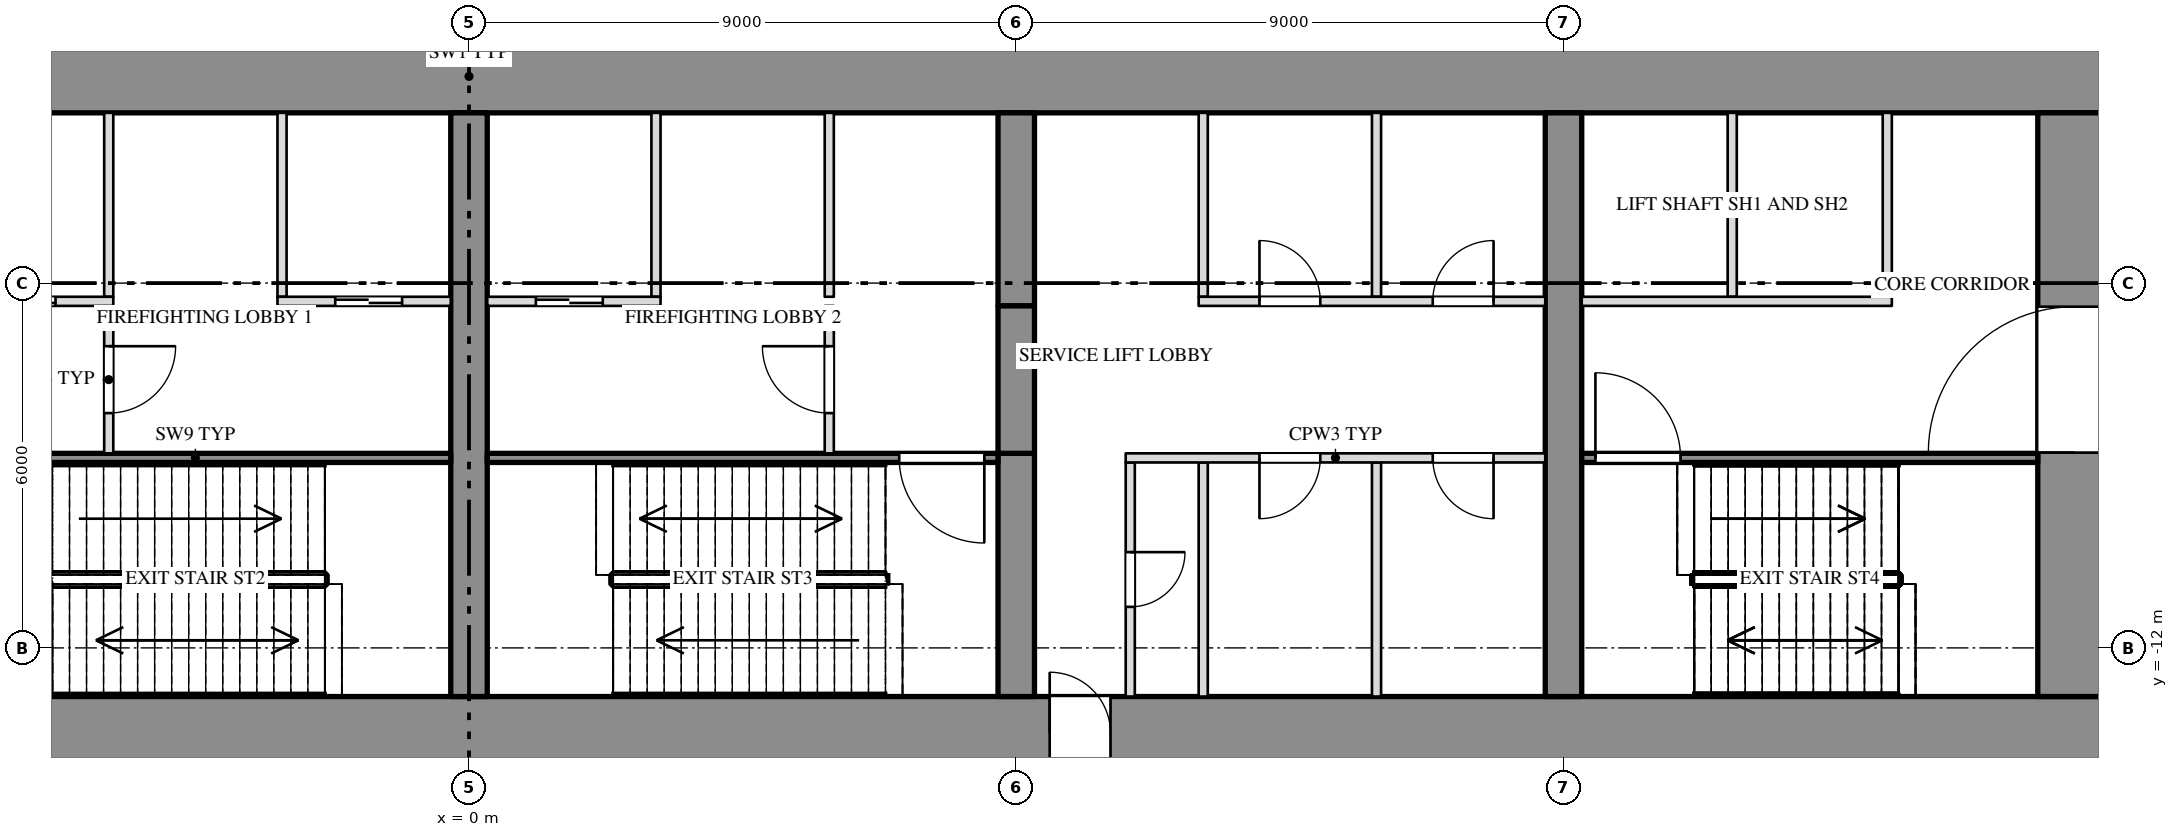
"""IFC4 building model, lengths in metres.
Left out: names, types, materials, properties, quantities, classifications, styles, units other than length and angle.
Written with IfcOpenShell. Run it as: python <this file> out.ifc"""

import sys

from ifc_helpers import new_model, si_unit, direction, frame, frame_2d, origin, place, context, subcontext, project, spatial, rectangle, extrude, element, fill, save


model = new_model("IFC4")
c1 = context("Model", 3, precision=1e-05, world=origin(), true_north=direction((0.0, 1.0)))
c2 = subcontext(c1, "Body", "Model", "MODEL_VIEW")
j1 = project(units=[si_unit("LENGTHUNIT", "METRE"), si_unit("PLANEANGLEUNIT", "RADIAN")], contexts=[c1])
p1 = place(None, origin())
s1 = spatial("IfcSite", under=j1, at=p1, CompositionType="ELEMENT")
p2 = place(p1, origin())
s2 = spatial("IfcBuilding", under=s1, at=p2, CompositionType="ELEMENT")
p3 = place(p2, frame((0.0, 0.0, 33.0)))
s3 = spatial("IfcBuildingStorey", under=s2, at=p3, CompositionType="ELEMENT", Elevation=33.0)
p4 = place(p3, frame((-27.0, -2.6, 0.0), z_axis=(0.0, 0.0, 1.0), x_axis=(1.0, 0.0, 0.0)))
e1 = element("IfcWall", 1, at=p4, inside=s3, PredefinedType="SHEAR", context=c2, shape_type="SweptSolid", body=[
    extrude(rectangle(XDim=54.0, YDim=1.2, at=frame_2d((27.0, 0.0))), origin(), (0.0, 0.0, 1.0), 5.75),
])
p5 = place(p3, frame((-27.0, -13.4, 0.0), z_axis=(0.0, 0.0, 1.0), x_axis=(1.0, 0.0, 0.0)))
e2 = element("IfcWall", 2, at=p5, inside=s3, PredefinedType="SHEAR", context=c2, shape_type="SweptSolid", body=[
    extrude(rectangle(XDim=54.0, YDim=1.2, at=frame_2d((27.0, 0.0))), origin(), (0.0, 0.0, 1.0), 5.75),
])
p6 = place(p5, frame((16.45, 0.0, 0.0)))
e3 = element("IfcOpeningElement", 3, at=p6, cuts=e2, PredefinedType="OPENING", context=c2, shape_type="SweptSolid", body=[
    extrude(rectangle(XDim=1.0, YDim=2.1, at=frame_2d((0.5, 1.05))), frame((0.0, 0.612, 0.0), z_axis=(0.0, -1.0, 0.0), x_axis=(1.0, 0.0, 0.0)), (0.0, 0.0, 1.0), 1.224),
])
p7 = place(p5, frame((36.55, 0.0, 0.0)))
e4 = element("IfcOpeningElement", 4, at=p7, cuts=e2, PredefinedType="OPENING", context=c2, shape_type="SweptSolid", body=[
    extrude(rectangle(XDim=1.0, YDim=2.1, at=frame_2d((0.5, 1.05))), frame((0.0, 0.612, 0.0), z_axis=(0.0, -1.0, 0.0), x_axis=(1.0, 0.0, 0.0)), (0.0, 0.0, 1.0), 1.224),
])
p8 = place(p3, frame((26.4, -12.8, 0.0), z_axis=(0.0, 0.0, 1.0), x_axis=(0.0, 1.0, 0.0)))
e5 = element("IfcWall", 5, at=p8, inside=s3, PredefinedType="SHEAR", context=c2, shape_type="SweptSolid", body=[
    extrude(rectangle(XDim=9.6, YDim=1.2, at=frame_2d((4.8, 0.0))), origin(), (0.0, 0.0, 1.0), 5.75),
])
p9 = place(p8, frame((4.012, 0.0, 0.0)))
e6 = element("IfcOpeningElement", 6, at=p9, cuts=e5, PredefinedType="OPENING", context=c2, shape_type="SweptSolid", body=[
    extrude(rectangle(XDim=2.4, YDim=2.1, at=frame_2d((1.2, 1.05))), frame((0.0, 0.612, 0.0), z_axis=(0.0, -1.0, 0.0), x_axis=(1.0, 0.0, 0.0)), (0.0, 0.0, 1.0), 1.224),
])
p10 = place(p3, frame((0.0, -12.8, 0.0), z_axis=(0.0, 0.0, 1.0), x_axis=(0.0, 1.0, 0.0)))
e7 = element("IfcWall", 7, at=p10, inside=s3, PredefinedType="SHEAR", context=c2, shape_type="SweptSolid", body=[
    extrude(rectangle(XDim=9.6, YDim=0.6, at=frame_2d((4.8, 0.0))), origin(), (0.0, 0.0, 1.0), 5.75),
])
p11 = place(p3, frame((9.0, -12.8, 0.0), z_axis=(0.0, 0.0, 1.0), x_axis=(0.0, 1.0, 0.0)))
e8 = element("IfcWall", 8, at=p11, inside=s3, PredefinedType="SHEAR", context=c2, shape_type="SweptSolid", body=[
    extrude(rectangle(XDim=4.0, YDim=0.6, at=frame_2d((2.0, 0.0))), origin(), (0.0, 0.0, 1.0), 5.75),
])
p12 = place(p3, frame((9.0, -6.375, 0.0), z_axis=(0.0, 0.0, 1.0), x_axis=(0.0, 1.0, 0.0)))
e9 = element("IfcWall", 9, at=p12, inside=s3, PredefinedType="SHEAR", context=c2, shape_type="SweptSolid", body=[
    extrude(rectangle(XDim=3.175, YDim=0.6, at=frame_2d((1.587, 0.0))), origin(), (0.0, 0.0, 1.0), 5.75),
])
p13 = place(p3, frame((9.0, -8.8, 3.6), z_axis=(0.0, 0.0, 1.0), x_axis=(0.0, 1.0, 0.0)))
e10 = element("IfcWall", 10, at=p13, inside=s3, PredefinedType="SHEAR", context=c2, shape_type="SweptSolid", body=[
    extrude(rectangle(XDim=2.425, YDim=0.6, at=frame_2d((1.212, 0.0))), origin(), (0.0, 0.0, 1.0), 2.15),
])
p14 = place(p3, frame((18.0, -12.8, 0.0), z_axis=(0.0, 0.0, 1.0), x_axis=(0.0, 1.0, 0.0)))
e11 = element("IfcWall", 11, at=p14, inside=s3, PredefinedType="SHEAR", context=c2, shape_type="SweptSolid", body=[
    extrude(rectangle(XDim=9.6, YDim=0.6, at=frame_2d((4.8, 0.0))), origin(), (0.0, 0.0, 1.0), 5.75),
])
for number, where, z_axis, x_axis in (
    (12, (-3.075, -6.225, 0.0), (0.0, 0.0, 1.0), (0.0, 1.0, 0.0)),
    (13, (-5.925, -6.225, 0.0), (0.0, 0.0, 1.0), (0.0, 1.0, 0.0)),
    (14, (3.075, -6.225, 0.0), (0.0, 0.0, 1.0), (0.0, 1.0, 0.0)),
    (15, (5.925, -6.225, 0.0), (0.0, 0.0, 1.0), (0.0, 1.0, 0.0)),
    (16, (12.075, -6.225, 0.0), (0.0, 0.0, 1.0), (0.0, 1.0, 0.0)),
    (17, (14.925, -6.225, 0.0), (0.0, 0.0, 1.0), (0.0, 1.0, 0.0)),
    (18, (20.775, -6.225, 0.0), (0.0, 0.0, 1.0), (0.0, 1.0, 0.0)),
    (19, (23.325, -6.225, 0.0), (0.0, 0.0, 1.0), (0.0, 1.0, 0.0)),
):
    element("IfcWall", number, at=place(p3, frame(where, z_axis=z_axis, x_axis=x_axis)), inside=s3, PredefinedType="PARTITIONING", context=c2, shape_type="SweptSolid", body=[
        extrude(rectangle(XDim=3.025, YDim=0.15, at=frame_2d((1.513, 0.0))), origin(), (0.0, 0.0, 1.0), 5.75),
    ])
p15 = place(p3, frame((10.875, -12.8, 0.0), z_axis=(0.0, 0.0, 1.0), x_axis=(0.0, 1.0, 0.0)))
e20 = element("IfcWall", 20, at=p15, inside=s3, PredefinedType="PARTITIONING", context=c2, shape_type="SweptSolid", body=[
    extrude(rectangle(XDim=3.85, YDim=0.15, at=frame_2d((1.925, 0.0))), origin(), (0.0, 0.0, 1.0), 5.75),
])
p16 = place(p15, frame((1.475, 0.0, 0.0)))
e21 = element("IfcOpeningElement", 21, at=p16, cuts=e20, PredefinedType="OPENING", context=c2, shape_type="SweptSolid", body=[
    extrude(rectangle(XDim=0.9, YDim=2.1, at=frame_2d((0.45, 1.05))), frame((0.0, 0.087, 0.0), z_axis=(0.0, -1.0, 0.0), x_axis=(1.0, 0.0, 0.0)), (0.0, 0.0, 1.0), 0.174),
])
for number, where, z_axis, x_axis in (
    (22, (12.075, -12.8, 0.0), (0.0, 0.0, 1.0), (0.0, 1.0, 0.0)),
    (23, (14.925, -12.8, 0.0), (0.0, 0.0, 1.0), (0.0, 1.0, 0.0)),
):
    element("IfcWall", number, at=place(p3, frame(where, z_axis=z_axis, x_axis=x_axis)), inside=s3, PredefinedType="PARTITIONING", context=c2, shape_type="SweptSolid", body=[
        extrude(rectangle(XDim=3.85, YDim=0.15, at=frame_2d((1.925, 0.0))), origin(), (0.0, 0.0, 1.0), 5.75),
    ])
p17 = place(p3, frame((-5.925, -8.8, 0.0), z_axis=(0.0, 0.0, 1.0), x_axis=(0.0, 1.0, 0.0)))
e24 = element("IfcWall", 24, at=p17, inside=s3, PredefinedType="PARTITIONING", context=c2, shape_type="SweptSolid", body=[
    extrude(rectangle(XDim=2.425, YDim=0.15, at=frame_2d((1.212, 0.0))), origin(), (0.0, 0.0, 1.0), 5.75),
])
p18 = place(p17, frame((0.662, 0.0, 0.0)))
e25 = element("IfcOpeningElement", 25, at=p18, cuts=e24, PredefinedType="OPENING", context=c2, shape_type="SweptSolid", body=[
    extrude(rectangle(XDim=1.1, YDim=2.1, at=frame_2d((0.55, 1.05))), frame((0.0, 0.087, 0.0), z_axis=(0.0, -1.0, 0.0), x_axis=(1.0, 0.0, 0.0)), (0.0, 0.0, 1.0), 0.174),
])
p19 = place(p3, frame((5.925, -8.8, 0.0), z_axis=(0.0, 0.0, 1.0), x_axis=(0.0, 1.0, 0.0)))
e26 = element("IfcWall", 26, at=p19, inside=s3, PredefinedType="PARTITIONING", context=c2, shape_type="SweptSolid", body=[
    extrude(rectangle(XDim=2.425, YDim=0.15, at=frame_2d((1.212, 0.0))), origin(), (0.0, 0.0, 1.0), 5.75),
])
p20 = place(p19, frame((0.662, 0.0, 0.0)))
e27 = element("IfcOpeningElement", 27, at=p20, cuts=e26, PredefinedType="OPENING", context=c2, shape_type="SweptSolid", body=[
    extrude(rectangle(XDim=1.1, YDim=2.1, at=frame_2d((0.55, 1.05))), frame((0.0, 0.087, 0.0), z_axis=(0.0, -1.0, 0.0), x_axis=(1.0, 0.0, 0.0)), (0.0, 0.0, 1.0), 0.174),
])
p21 = place(p3, frame((-8.7, -6.3, 0.0), z_axis=(0.0, 0.0, 1.0), x_axis=(1.0, 0.0, 0.0)))
e28 = element("IfcWall", 28, at=p21, inside=s3, PredefinedType="PARTITIONING", context=c2, shape_type="SweptSolid", body=[
    extrude(rectangle(XDim=2.85, YDim=0.15, at=frame_2d((1.425, 0.0))), origin(), (0.0, 0.0, 1.0), 5.75),
])
p22 = place(p21, frame((0.8, 0.0, 0.0)))
e29 = element("IfcOpeningElement", 29, at=p22, cuts=e28, PredefinedType="OPENING", context=c2, shape_type="SweptSolid", body=[
    extrude(rectangle(XDim=1.1, YDim=2.1, at=frame_2d((0.55, 1.05))), frame((0.0, 0.087, 0.0), z_axis=(0.0, -1.0, 0.0), x_axis=(1.0, 0.0, 0.0)), (0.0, 0.0, 1.0), 0.174),
])
p23 = place(p3, frame((-3.15, -6.3, 0.0), z_axis=(0.0, 0.0, 1.0), x_axis=(1.0, 0.0, 0.0)))
e30 = element("IfcWall", 30, at=p23, inside=s3, PredefinedType="PARTITIONING", context=c2, shape_type="SweptSolid", body=[
    extrude(rectangle(XDim=2.85, YDim=0.15, at=frame_2d((1.425, 0.0))), origin(), (0.0, 0.0, 1.0), 5.75),
])
p24 = place(p23, frame((0.95, 0.0, 0.0)))
e31 = element("IfcOpeningElement", 31, at=p24, cuts=e30, PredefinedType="OPENING", context=c2, shape_type="SweptSolid", body=[
    extrude(rectangle(XDim=1.1, YDim=2.1, at=frame_2d((0.55, 1.05))), frame((0.0, 0.087, 0.0), z_axis=(0.0, -1.0, 0.0), x_axis=(1.0, 0.0, 0.0)), (0.0, 0.0, 1.0), 0.174),
])
p25 = place(p3, frame((0.3, -6.3, 0.0), z_axis=(0.0, 0.0, 1.0), x_axis=(1.0, 0.0, 0.0)))
e32 = element("IfcWall", 32, at=p25, inside=s3, PredefinedType="PARTITIONING", context=c2, shape_type="SweptSolid", body=[
    extrude(rectangle(XDim=2.85, YDim=0.15, at=frame_2d((1.425, 0.0))), origin(), (0.0, 0.0, 1.0), 5.75),
])
p26 = place(p25, frame((0.8, 0.0, 0.0)))
e33 = element("IfcOpeningElement", 33, at=p26, cuts=e32, PredefinedType="OPENING", context=c2, shape_type="SweptSolid", body=[
    extrude(rectangle(XDim=1.1, YDim=2.1, at=frame_2d((0.55, 1.05))), frame((0.0, 0.087, 0.0), z_axis=(0.0, -1.0, 0.0), x_axis=(1.0, 0.0, 0.0)), (0.0, 0.0, 1.0), 0.174),
])
p27 = place(p3, frame((12.0, -6.3, 0.0), z_axis=(0.0, 0.0, 1.0), x_axis=(1.0, 0.0, 0.0)))
e34 = element("IfcWall", 34, at=p27, inside=s3, PredefinedType="PARTITIONING", context=c2, shape_type="SweptSolid", body=[
    extrude(rectangle(XDim=5.7, YDim=0.15, at=frame_2d((2.85, 0.0))), origin(), (0.0, 0.0, 1.0), 5.75),
])
p28 = place(p27, frame((1.0, 0.0, 0.0)))
e35 = element("IfcOpeningElement", 35, at=p28, cuts=e34, PredefinedType="OPENING", context=c2, shape_type="SweptSolid", body=[
    extrude(rectangle(XDim=1.0, YDim=2.1, at=frame_2d((0.5, 1.05))), frame((0.0, 0.087, 0.0), z_axis=(0.0, -1.0, 0.0), x_axis=(1.0, 0.0, 0.0)), (0.0, 0.0, 1.0), 0.174),
])
p29 = place(p27, frame((3.85, 0.0, 0.0)))
e36 = element("IfcOpeningElement", 36, at=p29, cuts=e34, PredefinedType="OPENING", context=c2, shape_type="SweptSolid", body=[
    extrude(rectangle(XDim=1.0, YDim=2.1, at=frame_2d((0.5, 1.05))), frame((0.0, 0.087, 0.0), z_axis=(0.0, -1.0, 0.0), x_axis=(1.0, 0.0, 0.0)), (0.0, 0.0, 1.0), 0.174),
])
p30 = place(p3, frame((18.3, -6.3, 0.0), z_axis=(0.0, 0.0, 1.0), x_axis=(1.0, 0.0, 0.0)))
e37 = element("IfcWall", 37, at=p30, inside=s3, PredefinedType="PARTITIONING", context=c2, shape_type="SweptSolid", body=[
    extrude(rectangle(XDim=5.1, YDim=0.15, at=frame_2d((2.55, 0.0))), origin(), (0.0, 0.0, 1.0), 5.75),
])
p31 = place(p3, frame((-8.7, -8.875, 0.0), z_axis=(0.0, 0.0, 1.0), x_axis=(1.0, 0.0, 0.0)))
e38 = element("IfcWall", 38, at=p31, inside=s3, PredefinedType="SHEAR", context=c2, shape_type="SweptSolid", body=[
    extrude(rectangle(XDim=8.4, YDim=0.15, at=frame_2d((4.2, 0.0))), origin(), (0.0, 0.0, 1.0), 5.75),
])
p32 = place(p31, frame((0.225, 0.0, 0.0)))
e39 = element("IfcOpeningElement", 39, at=p32, cuts=e38, PredefinedType="OPENING", context=c2, shape_type="SweptSolid", body=[
    extrude(rectangle(XDim=1.4, YDim=2.1, at=frame_2d((0.7, 1.05))), frame((0.0, 0.087, 0.0), z_axis=(0.0, -1.0, 0.0), x_axis=(1.0, 0.0, 0.0)), (0.0, 0.0, 1.0), 0.174),
])
p33 = place(p3, frame((0.3, -8.875, 0.0), z_axis=(0.0, 0.0, 1.0), x_axis=(1.0, 0.0, 0.0)))
e40 = element("IfcWall", 40, at=p33, inside=s3, PredefinedType="SHEAR", context=c2, shape_type="SweptSolid", body=[
    extrude(rectangle(XDim=8.4, YDim=0.15, at=frame_2d((4.2, 0.0))), origin(), (0.0, 0.0, 1.0), 5.75),
])
p34 = place(p33, frame((6.775, 0.0, 0.0)))
e41 = element("IfcOpeningElement", 41, at=p34, cuts=e40, PredefinedType="OPENING", context=c2, shape_type="SweptSolid", body=[
    extrude(rectangle(XDim=1.4, YDim=2.1, at=frame_2d((0.7, 1.05))), frame((0.0, 0.087, 0.0), z_axis=(0.0, -1.0, 0.0), x_axis=(1.0, 0.0, 0.0)), (0.0, 0.0, 1.0), 0.174),
])
p35 = place(p3, frame((10.8, -8.875, 0.0), z_axis=(0.0, 0.0, 1.0), x_axis=(1.0, 0.0, 0.0)))
e42 = element("IfcWall", 42, at=p35, inside=s3, PredefinedType="PARTITIONING", context=c2, shape_type="SweptSolid", body=[
    extrude(rectangle(XDim=6.9, YDim=0.15, at=frame_2d((3.45, 0.0))), origin(), (0.0, 0.0, 1.0), 5.75),
])
p36 = place(p35, frame((2.2, 0.0, 0.0)))
e43 = element("IfcOpeningElement", 43, at=p36, cuts=e42, PredefinedType="OPENING", context=c2, shape_type="SweptSolid", body=[
    extrude(rectangle(XDim=1.0, YDim=2.1, at=frame_2d((0.5, 1.05))), frame((0.0, 0.087, 0.0), z_axis=(0.0, -1.0, 0.0), x_axis=(1.0, 0.0, 0.0)), (0.0, 0.0, 1.0), 0.174),
])
p37 = place(p35, frame((5.05, 0.0, 0.0)))
e44 = element("IfcOpeningElement", 44, at=p37, cuts=e42, PredefinedType="OPENING", context=c2, shape_type="SweptSolid", body=[
    extrude(rectangle(XDim=1.0, YDim=2.1, at=frame_2d((0.5, 1.05))), frame((0.0, 0.087, 0.0), z_axis=(0.0, -1.0, 0.0), x_axis=(1.0, 0.0, 0.0)), (0.0, 0.0, 1.0), 0.174),
])
p38 = place(p3, frame((18.3, -8.875, 0.0), z_axis=(0.0, 0.0, 1.0), x_axis=(1.0, 0.0, 0.0)))
e45 = element("IfcWall", 45, at=p38, inside=s3, PredefinedType="SHEAR", context=c2, shape_type="SweptSolid", body=[
    extrude(rectangle(XDim=7.5, YDim=0.15, at=frame_2d((3.75, 0.0))), origin(), (0.0, 0.0, 1.0), 5.75),
])
p39 = place(p38, frame((0.225, 0.0, 0.0)))
e46 = element("IfcOpeningElement", 46, at=p39, cuts=e45, PredefinedType="OPENING", context=c2, shape_type="SweptSolid", body=[
    extrude(rectangle(XDim=1.4, YDim=2.1, at=frame_2d((0.7, 1.05))), frame((0.0, 0.087, 0.0), z_axis=(0.0, -1.0, 0.0), x_axis=(1.0, 0.0, 0.0)), (0.0, 0.0, 1.0), 0.174),
])
p40 = place(p22, origin())
e47 = element("IfcDoor", 47, at=p40, inside=s3, OperationType="SLIDING_TO_LEFT", PredefinedType="DOOR", context=c2, shape_type="SweptSolid", body=[
    extrude(rectangle(XDim=1.1, YDim=2.1, at=frame_2d((0.55, 1.05))), frame((0.0, 0.025, 0.0), z_axis=(0.0, -1.0, 0.0), x_axis=(1.0, 0.0, 0.0)), (0.0, 0.0, 1.0), 0.05),
])
fill(e29, e47)
p41 = place(p18, origin())
e48 = element("IfcDoor", 48, at=p41, inside=s3, OperationType="SINGLE_SWING_LEFT", PredefinedType="DOOR", context=c2, shape_type="SweptSolid", body=[
    extrude(rectangle(XDim=1.1, YDim=2.1, at=frame_2d((0.55, 1.05))), frame((0.0, 0.025, 0.0), z_axis=(0.0, -1.0, 0.0), x_axis=(1.0, 0.0, 0.0)), (0.0, 0.0, 1.0), 0.05),
])
fill(e25, e48)
p42 = place(p24, origin())
e49 = element("IfcDoor", 49, at=p42, inside=s3, OperationType="SLIDING_TO_LEFT", PredefinedType="DOOR", context=c2, shape_type="SweptSolid", body=[
    extrude(rectangle(XDim=1.1, YDim=2.1, at=frame_2d((0.55, 1.05))), frame((0.0, 0.025, 0.0), z_axis=(0.0, -1.0, 0.0), x_axis=(1.0, 0.0, 0.0)), (0.0, 0.0, 1.0), 0.05),
])
fill(e31, e49)
p43 = place(p26, origin())
e50 = element("IfcDoor", 50, at=p43, inside=s3, OperationType="SLIDING_TO_RIGHT", PredefinedType="DOOR", context=c2, shape_type="SweptSolid", body=[
    extrude(rectangle(XDim=1.1, YDim=2.1, at=frame_2d((0.55, 1.05))), frame((0.0, 0.025, 0.0), z_axis=(0.0, -1.0, 0.0), x_axis=(1.0, 0.0, 0.0)), (0.0, 0.0, 1.0), 0.05),
])
fill(e33, e50)
p44 = place(p20, origin())
e51 = element("IfcDoor", 51, at=p44, inside=s3, OperationType="SINGLE_SWING_RIGHT", PredefinedType="DOOR", context=c2, shape_type="SweptSolid", body=[
    extrude(rectangle(XDim=1.1, YDim=2.1, at=frame_2d((0.55, 1.05))), frame((0.0, 0.025, 0.0), z_axis=(0.0, -1.0, 0.0), x_axis=(1.0, 0.0, 0.0)), (0.0, 0.0, 1.0), 0.05),
])
fill(e27, e51)
p45 = place(p34, origin())
e52 = element("IfcDoor", 52, at=p45, inside=s3, OperationType="DOUBLE_DOOR_SINGLE_SWING", PredefinedType="DOOR", context=c2, shape_type="SweptSolid", body=[
    extrude(rectangle(XDim=1.4, YDim=2.1, at=frame_2d((0.7, 1.05))), frame((0.0, 0.025, 0.0), z_axis=(0.0, -1.0, 0.0), x_axis=(1.0, 0.0, 0.0)), (0.0, 0.0, 1.0), 0.05),
])
fill(e41, e52)
p46 = place(p7, origin())
e53 = element("IfcDoor", 53, at=p46, inside=s3, OperationType="SINGLE_SWING_LEFT", PredefinedType="DOOR", context=c2, shape_type="SweptSolid", body=[
    extrude(rectangle(XDim=1.0, YDim=2.1, at=frame_2d((0.5, 1.05))), frame((0.0, 0.025, 0.0), z_axis=(0.0, -1.0, 0.0), x_axis=(1.0, 0.0, 0.0)), (0.0, 0.0, 1.0), 0.05),
])
fill(e4, e53)
p47 = place(p16, origin())
e54 = element("IfcDoor", 54, at=p47, inside=s3, OperationType="SINGLE_SWING_LEFT", PredefinedType="DOOR", context=c2, shape_type="SweptSolid", body=[
    extrude(rectangle(XDim=0.9, YDim=2.1, at=frame_2d((0.45, 1.05))), frame((0.0, 0.025, 0.0), z_axis=(0.0, -1.0, 0.0), x_axis=(1.0, 0.0, 0.0)), (0.0, 0.0, 1.0), 0.05),
])
fill(e21, e54)
p48 = place(p36, origin())
e55 = element("IfcDoor", 55, at=p48, inside=s3, OperationType="SINGLE_SWING_RIGHT", PredefinedType="DOOR", context=c2, shape_type="SweptSolid", body=[
    extrude(rectangle(XDim=1.0, YDim=2.1, at=frame_2d((0.5, 1.05))), frame((0.0, 0.025, 0.0), z_axis=(0.0, -1.0, 0.0), x_axis=(1.0, 0.0, 0.0)), (0.0, 0.0, 1.0), 0.05),
])
fill(e43, e55)
p49 = place(p28, origin())
e56 = element("IfcDoor", 56, at=p49, inside=s3, OperationType="SINGLE_SWING_LEFT", PredefinedType="DOOR", context=c2, shape_type="SweptSolid", body=[
    extrude(rectangle(XDim=1.0, YDim=2.1, at=frame_2d((0.5, 1.05))), frame((0.0, 0.025, 0.0), z_axis=(0.0, -1.0, 0.0), x_axis=(1.0, 0.0, 0.0)), (0.0, 0.0, 1.0), 0.05),
])
fill(e35, e56)
p50 = place(p37, origin())
e57 = element("IfcDoor", 57, at=p50, inside=s3, OperationType="SINGLE_SWING_LEFT", PredefinedType="DOOR", context=c2, shape_type="SweptSolid", body=[
    extrude(rectangle(XDim=1.0, YDim=2.1, at=frame_2d((0.5, 1.05))), frame((0.0, 0.025, 0.0), z_axis=(0.0, -1.0, 0.0), x_axis=(1.0, 0.0, 0.0)), (0.0, 0.0, 1.0), 0.05),
])
fill(e44, e57)
p51 = place(p29, origin())
e58 = element("IfcDoor", 58, at=p51, inside=s3, OperationType="SINGLE_SWING_RIGHT", PredefinedType="DOOR", context=c2, shape_type="SweptSolid", body=[
    extrude(rectangle(XDim=1.0, YDim=2.1, at=frame_2d((0.5, 1.05))), frame((0.0, 0.025, 0.0), z_axis=(0.0, -1.0, 0.0), x_axis=(1.0, 0.0, 0.0)), (0.0, 0.0, 1.0), 0.05),
])
fill(e36, e58)
p52 = place(p39, origin())
e59 = element("IfcDoor", 59, at=p52, inside=s3, OperationType="DOUBLE_DOOR_SINGLE_SWING", PredefinedType="DOOR", context=c2, shape_type="SweptSolid", body=[
    extrude(rectangle(XDim=1.4, YDim=2.1, at=frame_2d((0.7, 1.05))), frame((0.0, 0.025, 0.0), z_axis=(0.0, -1.0, 0.0), x_axis=(1.0, 0.0, 0.0)), (0.0, 0.0, 1.0), 0.05),
])
fill(e46, e59)
p53 = place(p9, origin())
e60 = element("IfcDoor", 60, at=p53, inside=s3, OperationType="DOUBLE_DOOR_SINGLE_SWING", PredefinedType="DOOR", context=c2, shape_type="SweptSolid", body=[
    extrude(rectangle(XDim=2.4, YDim=2.1, at=frame_2d((1.2, 1.05))), frame((0.0, 0.025, 0.0), z_axis=(0.0, -1.0, 0.0), x_axis=(1.0, 0.0, 0.0)), (0.0, 0.0, 1.0), 0.05),
])
fill(e6, e60)
save(model, sys.argv[1])
